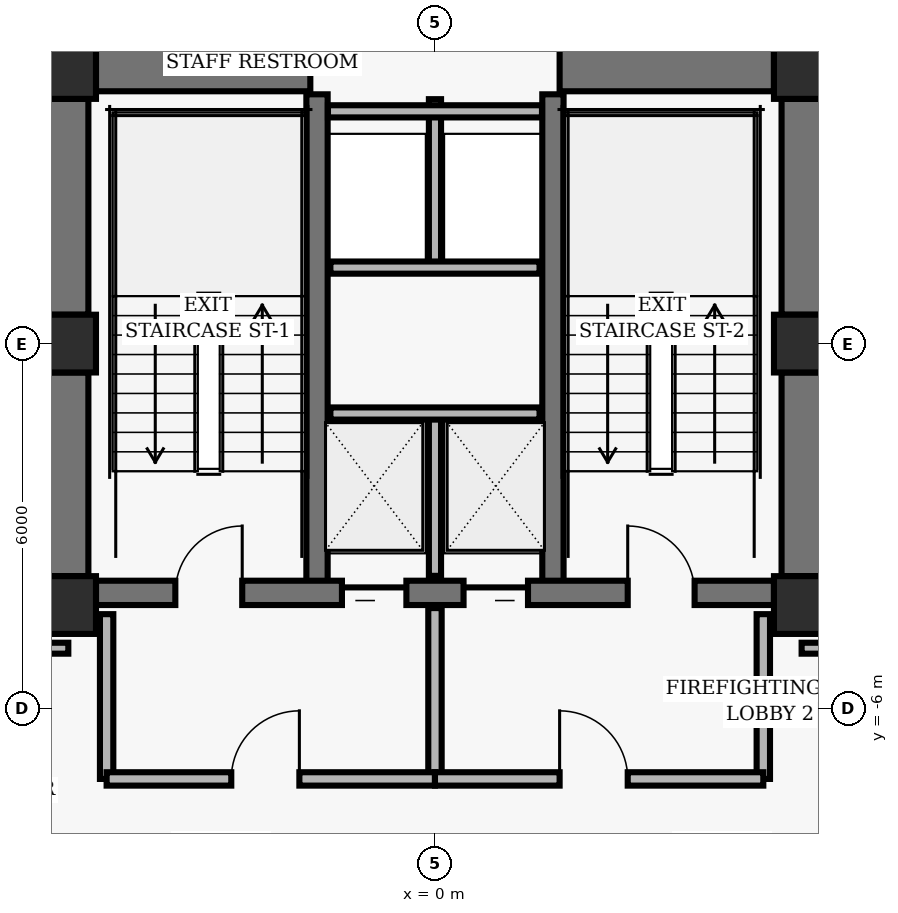
"""IFC4 building model, lengths in metres.
Left out: names, types, materials, properties, quantities, classifications, styles, units other than length and angle.
Written with IfcOpenShell. Run it as: python <this file> out.ifc"""

import sys

from ifc_helpers import new_model, si_unit, direction, frame, frame_2d, origin, origin_2d, place, context, subcontext, project, spatial, rectangle, hollow_rectangle, extrude, element, fill, save


model = new_model("IFC4")
c1 = context("Model", 3, precision=1e-05, world=origin(), true_north=direction((0.0, 1.0)))
c2 = subcontext(c1, "Body", "Model", "MODEL_VIEW")
j1 = project(units=[si_unit("LENGTHUNIT", "METRE"), si_unit("PLANEANGLEUNIT", "RADIAN")], contexts=[c1])
p1 = place(None, origin())
s1 = spatial("IfcSite", under=j1, at=p1, CompositionType="ELEMENT")
p2 = place(p1, origin())
s2 = spatial("IfcBuilding", under=s1, at=p2, CompositionType="ELEMENT")
p3 = place(p2, frame((0.0, 0.0, 18.88)))
s3 = spatial("IfcBuildingStorey", under=s2, at=p3, CompositionType="ELEMENT", Elevation=18.88)
for number, where, z_axis, x_axis in (
    (1, (-6.05, 4.5, 0.0), (0.0, 0.0, 1.0), (1.0, 0.0, 0.0)),
    (2, (6.05, 4.5, 0.0), (0.0, 0.0, 1.0), (1.0, 0.0, 0.0)),
    (3, (-6.05, 0.0, 0.0), (0.0, 0.0, 1.0), (1.0, 0.0, 0.0)),
    (4, (6.05, 0.0, 0.0), (0.0, 0.0, 1.0), (1.0, 0.0, 0.0)),
    (5, (-6.05, -4.3, 0.0), (0.0, 0.0, 1.0), (1.0, 0.0, 0.0)),
    (6, (6.05, -4.3, 0.0), (0.0, 0.0, 1.0), (1.0, 0.0, 0.0)),
):
    element("IfcColumn", number, at=place(p3, frame(where, z_axis=z_axis, x_axis=x_axis)), inside=s3, PredefinedType="COLUMN", context=c2, shape_type="SweptSolid", body=[
        extrude(hollow_rectangle(XDim=0.95, YDim=0.95, WallThickness=0.06, InnerFilletRadius=0.02, OuterFilletRadius=0.04, at=origin_2d()), origin(), (0.0, 0.0, 1.0), 3.36),
    ])
p4 = place(p3, frame((-6.05, 0.475, 0.0), z_axis=(0.0, 0.0, 1.0), x_axis=(0.0, 1.0, 0.0)))
e7 = element("IfcWall", 7, at=p4, inside=s3, PredefinedType="SHEAR", context=c2, shape_type="SweptSolid", body=[
    extrude(rectangle(XDim=3.55, YDim=0.7, at=frame_2d((1.775, 0.0))), origin(), (0.0, 0.0, 1.0), 3.098),
])
p5 = place(p3, frame((-6.05, -3.825, 0.0), z_axis=(0.0, 0.0, 1.0), x_axis=(0.0, 1.0, 0.0)))
e8 = element("IfcWall", 8, at=p5, inside=s3, PredefinedType="SHEAR", context=c2, shape_type="SweptSolid", body=[
    extrude(rectangle(XDim=3.35, YDim=0.7, at=frame_2d((1.675, 0.0))), origin(), (0.0, 0.0, 1.0), 3.098),
])
p6 = place(p3, frame((6.05, 0.475, 0.0), z_axis=(0.0, 0.0, 1.0), x_axis=(0.0, 1.0, 0.0)))
e9 = element("IfcWall", 9, at=p6, inside=s3, PredefinedType="SHEAR", context=c2, shape_type="SweptSolid", body=[
    extrude(rectangle(XDim=3.55, YDim=0.7, at=frame_2d((1.775, 0.0))), origin(), (0.0, 0.0, 1.0), 3.098),
])
p7 = place(p3, frame((6.05, -3.825, 0.0), z_axis=(0.0, 0.0, 1.0), x_axis=(0.0, 1.0, 0.0)))
e10 = element("IfcWall", 10, at=p7, inside=s3, PredefinedType="SHEAR", context=c2, shape_type="SweptSolid", body=[
    extrude(rectangle(XDim=3.35, YDim=0.7, at=frame_2d((1.675, 0.0))), origin(), (0.0, 0.0, 1.0), 3.098),
])
for number, where, z_axis, x_axis in (
    (11, (-1.94, -4.1, 0.0), (0.0, 0.0, 1.0), (0.0, 1.0, 0.0)),
    (12, (1.94, -4.1, 0.0), (0.0, 0.0, 1.0), (0.0, 1.0, 0.0)),
):
    element("IfcWall", number, at=place(p3, frame(where, z_axis=z_axis, x_axis=x_axis)), inside=s3, PredefinedType="SHEAR", context=c2, shape_type="SweptSolid", body=[
        extrude(rectangle(XDim=8.2, YDim=0.35, at=frame_2d((4.1, 0.0))), origin(), (0.0, 0.0, 1.0), 3.098),
    ])
p8 = place(p3, frame((-5.575, -4.1, 0.0), z_axis=(0.0, 0.0, 1.0), x_axis=(1.0, 0.0, 0.0)))
e13 = element("IfcWall", 13, at=p8, inside=s3, PredefinedType="SHEAR", context=c2, shape_type="SweptSolid", body=[
    extrude(rectangle(XDim=11.15, YDim=0.4, at=frame_2d((5.575, 0.0))), origin(), (0.0, 0.0, 1.0), 3.098),
])
p9 = place(p8, frame((1.305, 0.0, 0.0)))
e14 = element("IfcOpeningElement", 14, at=p9, cuts=e13, PredefinedType="OPENING", context=c2, shape_type="SweptSolid", body=[
    extrude(rectangle(XDim=1.1, YDim=2.04, at=frame_2d((0.55, 1.02))), frame((0.0, 0.21, 0.0), z_axis=(0.0, -1.0, 0.0), x_axis=(1.0, 0.0, 0.0)), (0.0, 0.0, 1.0), 0.42),
])
p10 = place(p8, frame((8.745, 0.0, 0.0)))
e15 = element("IfcOpeningElement", 15, at=p10, cuts=e13, PredefinedType="OPENING", context=c2, shape_type="SweptSolid", body=[
    extrude(rectangle(XDim=1.1, YDim=2.04, at=frame_2d((0.55, 1.02))), frame((0.0, 0.21, 0.0), z_axis=(0.0, -1.0, 0.0), x_axis=(1.0, 0.0, 0.0)), (0.0, 0.0, 1.0), 0.42),
])
p11 = place(p8, frame((4.045, 0.0, 0.0)))
e16 = element("IfcOpeningElement", 16, at=p11, cuts=e13, PredefinedType="OPENING", context=c2, shape_type="SweptSolid", body=[
    extrude(rectangle(XDim=1.06, YDim=2.04, at=frame_2d((0.53, 1.02))), frame((0.0, 0.21, 0.0), z_axis=(0.0, -1.0, 0.0), x_axis=(1.0, 0.0, 0.0)), (0.0, 0.0, 1.0), 0.42),
])
p12 = place(p8, frame((6.045, 0.0, 0.0)))
e17 = element("IfcOpeningElement", 17, at=p12, cuts=e13, PredefinedType="OPENING", context=c2, shape_type="SweptSolid", body=[
    extrude(rectangle(XDim=1.06, YDim=2.04, at=frame_2d((0.53, 1.02))), frame((0.0, 0.21, 0.0), z_axis=(0.0, -1.0, 0.0), x_axis=(1.0, 0.0, 0.0)), (0.0, 0.0, 1.0), 0.42),
])
for number, where, z_axis, x_axis in (
    (18, (-5.575, 4.5, 0.0), (0.0, 0.0, 1.0), (1.0, 0.0, 0.0)),
    (19, (2.05, 4.5, 0.0), (0.0, 0.0, 1.0), (1.0, 0.0, 0.0)),
):
    element("IfcWall", number, at=place(p3, frame(where, z_axis=z_axis, x_axis=x_axis)), inside=s3, PredefinedType="SHEAR", context=c2, shape_type="SweptSolid", body=[
        extrude(rectangle(XDim=3.525, YDim=0.7, at=frame_2d((1.762, 0.0))), origin(), (0.0, 0.0, 1.0), 3.098),
    ])
p13 = place(p3, frame((30.165, -0.311, 0.0), z_axis=(0.0, 0.0, 1.0), x_axis=(-0.852639202063, -0.522500135029, 0.0)))
e20 = element("IfcWall", 20, at=p13, inside=s3, PredefinedType="PARAPET", context=c2, shape_type="SweptSolid", body=[
    extrude(rectangle(XDim=51.035, YDim=0.24, at=frame_2d((25.518, 0.0))), origin(), (0.0, 0.0, 1.0), 1.65),
])
p14 = place(p3, frame((0.0, -3.82, 0.0), z_axis=(0.0, 0.0, 1.0), x_axis=(0.0, 1.0, 0.0)))
e21 = element("IfcWall", 21, at=p14, inside=s3, PredefinedType="PARTITIONING", context=c2, shape_type="SweptSolid", body=[
    extrude(rectangle(XDim=2.67, YDim=0.2, at=frame_2d((1.335, 0.0))), origin(), (0.0, 0.0, 1.0), 3.073),
])
p15 = place(p3, frame((-1.72, -1.15, 0.0), z_axis=(0.0, 0.0, 1.0), x_axis=(1.0, 0.0, 0.0)))
e22 = element("IfcWall", 22, at=p15, inside=s3, PredefinedType="PARTITIONING", context=c2, shape_type="SweptSolid", body=[
    extrude(rectangle(XDim=3.44, YDim=0.2, at=frame_2d((1.72, 0.0))), origin(), (0.0, 0.0, 1.0), 3.073),
])
for number, where, z_axis, x_axis in (
    (23, (-5.4, -7.16, 0.0), (0.0, 0.0, 1.0), (0.0, 1.0, 0.0)),
    (24, (5.4, -7.16, 0.0), (0.0, 0.0, 1.0), (0.0, 1.0, 0.0)),
):
    element("IfcWall", number, at=place(p3, frame(where, z_axis=z_axis, x_axis=x_axis)), inside=s3, PredefinedType="PARTITIONING", context=c2, shape_type="SweptSolid", body=[
        extrude(rectangle(XDim=2.71, YDim=0.22, at=frame_2d((1.355, 0.0))), origin(), (0.0, 0.0, 1.0), 3.073),
    ])
p16 = place(p3, frame((0.0, -7.16, 0.0), z_axis=(0.0, 0.0, 1.0), x_axis=(0.0, 1.0, 0.0)))
e25 = element("IfcWall", 25, at=p16, inside=s3, PredefinedType="PARTITIONING", context=c2, shape_type="SweptSolid", body=[
    extrude(rectangle(XDim=2.81, YDim=0.22, at=frame_2d((1.405, 0.0))), origin(), (0.0, 0.0, 1.0), 3.073),
])
p17 = place(p3, frame((-5.4, -7.16, 0.0), z_axis=(0.0, 0.0, 1.0), x_axis=(1.0, 0.0, 0.0)))
e26 = element("IfcWall", 26, at=p17, inside=s3, PredefinedType="PARTITIONING", context=c2, shape_type="SweptSolid", body=[
    extrude(rectangle(XDim=5.4, YDim=0.22, at=frame_2d((2.7, 0.0))), origin(), (0.0, 0.0, 1.0), 3.073),
])
p18 = place(p17, frame((2.05, 0.0, 0.0)))
e27 = element("IfcOpeningElement", 27, at=p18, cuts=e26, PredefinedType="OPENING", context=c2, shape_type="SweptSolid", body=[
    extrude(rectangle(XDim=1.12, YDim=2.02, at=frame_2d((0.56, 1.01))), frame((0.0, 0.12, 0.0), z_axis=(0.0, -1.0, 0.0), x_axis=(1.0, 0.0, 0.0)), (0.0, 0.0, 1.0), 0.24),
])
p19 = place(p3, frame((0.0, -7.16, 0.0), z_axis=(0.0, 0.0, 1.0), x_axis=(1.0, 0.0, 0.0)))
e28 = element("IfcWall", 28, at=p19, inside=s3, PredefinedType="PARTITIONING", context=c2, shape_type="SweptSolid", body=[
    extrude(rectangle(XDim=5.4, YDim=0.22, at=frame_2d((2.7, 0.0))), origin(), (0.0, 0.0, 1.0), 3.073),
])
p20 = place(p19, frame((2.05, 0.0, 0.0)))
e29 = element("IfcOpeningElement", 29, at=p20, cuts=e28, PredefinedType="OPENING", context=c2, shape_type="SweptSolid", body=[
    extrude(rectangle(XDim=1.12, YDim=2.02, at=frame_2d((0.56, 1.01))), frame((0.0, 0.12, 0.0), z_axis=(0.0, -1.0, 0.0), x_axis=(1.0, 0.0, 0.0)), (0.0, 0.0, 1.0), 0.24),
])
p21 = place(p3, frame((0.0, 1.25, 0.0), z_axis=(0.0, 0.0, 1.0), x_axis=(0.0, 1.0, 0.0)))
e30 = element("IfcWall", 30, at=p21, inside=s3, PredefinedType="PARTITIONING", context=c2, shape_type="SweptSolid", body=[
    extrude(rectangle(XDim=2.77, YDim=0.2, at=frame_2d((1.385, 0.0))), origin(), (0.0, 0.0, 1.0), 3.073),
])
p22 = place(p3, frame((-1.72, 1.25, 0.0), z_axis=(0.0, 0.0, 1.0), x_axis=(1.0, 0.0, 0.0)))
e31 = element("IfcWall", 31, at=p22, inside=s3, PredefinedType="PARTITIONING", context=c2, shape_type="SweptSolid", body=[
    extrude(rectangle(XDim=3.44, YDim=0.2, at=frame_2d((1.72, 0.0))), origin(), (0.0, 0.0, 1.0), 3.073),
])
p23 = place(p3, frame((-1.76, 3.82, 0.0), z_axis=(0.0, 0.0, 1.0), x_axis=(1.0, 0.0, 0.0)))
e32 = element("IfcWall", 32, at=p23, inside=s3, PredefinedType="PARTITIONING", context=c2, shape_type="SweptSolid", body=[
    extrude(rectangle(XDim=3.52, YDim=0.2, at=frame_2d((1.76, 0.0))), origin(), (0.0, 0.0, 1.0), 3.073),
])
for number, where, z_axis, x_axis in (
    (33, (-9.37, -5.01, 0.0), (0.0, 0.0, 1.0), (1.0, 0.0, 0.0)),
    (34, (6.03, -5.01, 0.0), (0.0, 0.0, 1.0), (1.0, 0.0, 0.0)),
):
    element("IfcWall", number, at=place(p3, frame(where, z_axis=z_axis, x_axis=x_axis)), inside=s3, PredefinedType="PARTITIONING", context=c2, shape_type="SweptSolid", body=[
        extrude(rectangle(XDim=3.34, YDim=0.18, at=frame_2d((1.67, 0.0))), origin(), (0.0, 0.0, 1.0), 3.073),
    ])
p24 = place(p9, origin())
e35 = element("IfcDoor", 35, at=p24, inside=s3, OperationType="SINGLE_SWING_RIGHT", PredefinedType="DOOR", context=c2, shape_type="SweptSolid", body=[
    extrude(rectangle(XDim=1.1, YDim=2.04, at=frame_2d((0.55, 1.02))), frame((0.0, 0.025, 0.0), z_axis=(0.0, -1.0, 0.0), x_axis=(1.0, 0.0, 0.0)), (0.0, 0.0, 1.0), 0.05),
])
fill(e14, e35)
p25 = place(p10, origin())
e36 = element("IfcDoor", 36, at=p25, inside=s3, OperationType="SINGLE_SWING_LEFT", PredefinedType="DOOR", context=c2, shape_type="SweptSolid", body=[
    extrude(rectangle(XDim=1.1, YDim=2.04, at=frame_2d((0.55, 1.02))), frame((0.0, 0.025, 0.0), z_axis=(0.0, -1.0, 0.0), x_axis=(1.0, 0.0, 0.0)), (0.0, 0.0, 1.0), 0.05),
])
fill(e15, e36)
p26 = place(p11, origin())
e37 = element("IfcDoor", 37, at=p26, inside=s3, OperationType="SLIDING_TO_LEFT", PredefinedType="DOOR", context=c2, shape_type="SweptSolid", body=[
    extrude(rectangle(XDim=1.06, YDim=2.04, at=frame_2d((0.53, 1.02))), frame((0.0, 0.025, 0.0), z_axis=(0.0, -1.0, 0.0), x_axis=(1.0, 0.0, 0.0)), (0.0, 0.0, 1.0), 0.05),
])
fill(e16, e37)
p27 = place(p12, origin())
e38 = element("IfcDoor", 38, at=p27, inside=s3, OperationType="SLIDING_TO_RIGHT", PredefinedType="DOOR", context=c2, shape_type="SweptSolid", body=[
    extrude(rectangle(XDim=1.06, YDim=2.04, at=frame_2d((0.53, 1.02))), frame((0.0, 0.025, 0.0), z_axis=(0.0, -1.0, 0.0), x_axis=(1.0, 0.0, 0.0)), (0.0, 0.0, 1.0), 0.05),
])
fill(e17, e38)
p28 = place(p18, origin())
e39 = element("IfcDoor", 39, at=p28, inside=s3, OperationType="SINGLE_SWING_RIGHT", PredefinedType="DOOR", context=c2, shape_type="SweptSolid", body=[
    extrude(rectangle(XDim=1.12, YDim=2.02, at=frame_2d((0.56, 1.01))), frame((0.0, 0.025, 0.0), z_axis=(0.0, -1.0, 0.0), x_axis=(1.0, 0.0, 0.0)), (0.0, 0.0, 1.0), 0.05),
])
fill(e27, e39)
p29 = place(p20, origin())
e40 = element("IfcDoor", 40, at=p29, inside=s3, OperationType="SINGLE_SWING_LEFT", PredefinedType="DOOR", context=c2, shape_type="SweptSolid", body=[
    extrude(rectangle(XDim=1.12, YDim=2.02, at=frame_2d((0.56, 1.01))), frame((0.0, 0.025, 0.0), z_axis=(0.0, -1.0, 0.0), x_axis=(1.0, 0.0, 0.0)), (0.0, 0.0, 1.0), 0.05),
])
fill(e29, e40)
save(model, sys.argv[1])
